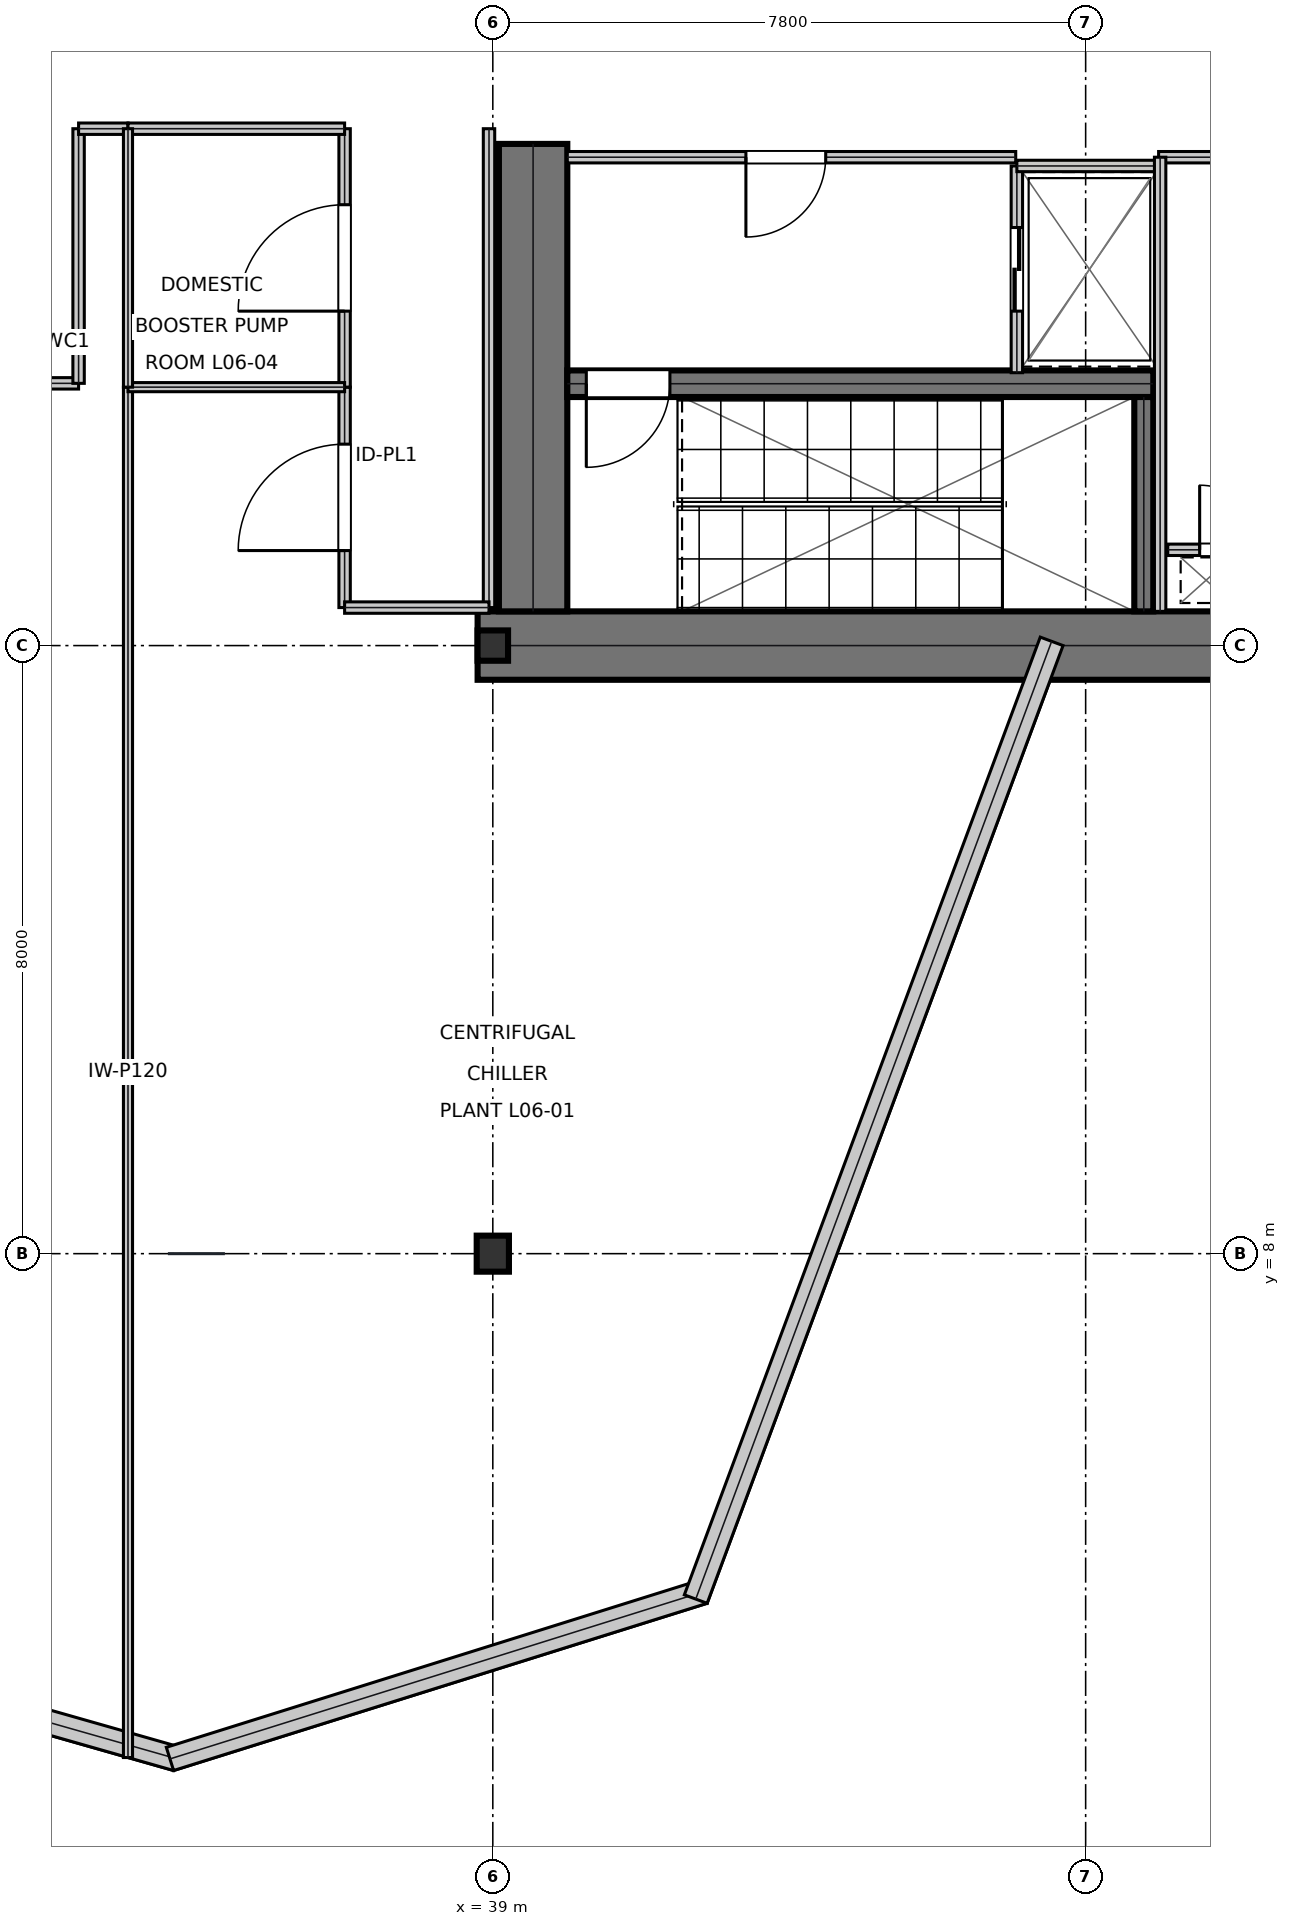
"""IFC4 building model, lengths in metres.
Left out: names, types, materials, properties, quantities, classifications, styles, units other than length and angle.
Written with IfcOpenShell. Run it as: python <this file> out.ifc"""

import sys

from ifc_helpers import new_model, si_unit, direction, frame, frame_2d, origin, origin_2d, place, context, subcontext, project, spatial, rectangle, i_section, extrude, element, fill, save


model = new_model("IFC4")
c1 = context("Model", 3, precision=1e-05, world=origin(), true_north=direction((0.0, 1.0)))
c2 = subcontext(c1, "Body", "Model", "MODEL_VIEW")
j1 = project(units=[si_unit("LENGTHUNIT", "METRE"), si_unit("PLANEANGLEUNIT", "RADIAN")], contexts=[c1])
p1 = place(None, origin())
s1 = spatial("IfcSite", under=j1, at=p1, CompositionType="ELEMENT")
p2 = place(p1, origin())
s2 = spatial("IfcBuilding", under=s1, at=p2, CompositionType="ELEMENT")
p3 = place(p2, frame((0.0, 0.0, 32.4)))
s3 = spatial("IfcBuildingStorey", under=s2, at=p3, CompositionType="ELEMENT", Elevation=32.4)
p4 = place(p3, frame((38.8, 16.0, 0.0), z_axis=(0.0, 0.0, 1.0), x_axis=(1.0, 0.0, 0.0)))
e1 = element("IfcWall", 1, at=p4, inside=s3, PredefinedType="SHEAR", context=c2, shape_type="SweptSolid", body=[
    extrude(rectangle(XDim=16.0, YDim=0.9, at=frame_2d((8.0, 0.0))), origin(), (0.0, 0.0, 1.0), 5.16),
])
p5 = place(p3, frame((39.53, 16.45, 0.0), z_axis=(0.0, 0.0, 1.0), x_axis=(0.0, 1.0, 0.0)))
e2 = element("IfcWall", 2, at=p5, inside=s3, PredefinedType="SHEAR", context=c2, shape_type="SweptSolid", body=[
    extrude(rectangle(XDim=6.15, YDim=0.9, at=frame_2d((3.075, 0.0))), origin(), (0.0, 0.0, 1.0), 5.16),
])
p6 = place(p3, frame((39.98, 19.445, 0.0), z_axis=(0.0, 0.0, 1.0), x_axis=(1.0, 0.0, 0.0)))
e3 = element("IfcWall", 3, at=p6, inside=s3, PredefinedType="SHEAR", context=c2, shape_type="SweptSolid", body=[
    extrude(rectangle(XDim=7.71, YDim=0.35, at=frame_2d((3.855, 0.0))), origin(), (0.0, 0.0, 1.0), 5.16),
])
p7 = place(p6, frame((0.25, 0.0, 0.0)))
e4 = element("IfcOpeningElement", 4, at=p7, cuts=e3, PredefinedType="OPENING", context=c2, shape_type="SweptSolid", body=[
    extrude(rectangle(XDim=1.1, YDim=2.15, at=frame_2d((0.55, 1.075))), frame((0.0, 0.185, 0.0), z_axis=(0.0, -1.0, 0.0), x_axis=(1.0, 0.0, 0.0)), (0.0, 0.0, 1.0), 0.37),
])
p8 = place(p3, frame((47.565, 16.45, 0.0), z_axis=(0.0, 0.0, 1.0), x_axis=(0.0, 1.0, 0.0)))
e5 = element("IfcWall", 5, at=p8, inside=s3, PredefinedType="SHEAR", context=c2, shape_type="SweptSolid", body=[
    extrude(rectangle(XDim=2.82, YDim=0.25, at=frame_2d((1.41, 0.0))), origin(), (0.0, 0.0, 1.0), 5.16),
])
p9 = place(p3, frame((39.0, 16.0, 0.0), z_axis=(0.0, 0.0, 1.0), x_axis=(1.0, 0.0, 0.0)))
e6 = element("IfcColumn", 6, at=p9, inside=s3, PredefinedType="COLUMN", context=c2, shape_type="SweptSolid", body=[
    extrude(i_section(OverallWidth=0.401, OverallDepth=0.399, WebThickness=0.025, FlangeThickness=0.04, at=origin_2d()), origin(), (0.0, 0.0, 1.0), 5.394),
])
p10 = place(p3, frame((39.0, 8.0, 0.016), z_axis=(-0.002773965371, 0.016780216752, 0.99985535426), x_axis=(-0.986609855888, -0.163098106258, 0.0)))
e7 = element("IfcColumn", 7, at=p10, inside=s3, PredefinedType="COLUMN", context=c2, shape_type="SweptSolid", body=[
    extrude(i_section(OverallWidth=0.424, OverallDepth=0.474, WebThickness=0.048, FlangeThickness=0.077, at=origin_2d()), origin(), (0.0, 0.0, 1.0), 5.369),
])
p11 = place(p3, frame((27.824, 3.354, 0.0), z_axis=(0.0, 0.0, 1.0), x_axis=(0.961730666524, -0.273996578569, 0.0)))
e8 = element("IfcWall", 8, at=p11, inside=s3, PredefinedType="STANDARD", context=c2, shape_type="SweptSolid", body=[
    extrude(rectangle(XDim=7.299, YDim=0.32, at=frame_2d((3.65, 0.0))), origin(), (0.0, 0.0, 1.0), 5.16),
])
p12 = place(p3, frame((34.752, 1.353, 0.0), z_axis=(0.0, 0.0, 1.0), x_axis=(0.954239925005, 0.299042079858, 0.0)))
e9 = element("IfcWall", 9, at=p12, inside=s3, PredefinedType="STANDARD", context=c2, shape_type="SweptSolid", body=[
    extrude(rectangle(XDim=7.357, YDim=0.32, at=frame_2d((3.678, 0.0))), origin(), (0.0, 0.0, 1.0), 5.16),
])
p13 = place(p3, frame((41.67, 3.456, 0.0), z_axis=(0.0, 0.0, 1.0), x_axis=(0.34837713867, 0.937354452303, 0.0)))
e10 = element("IfcWall", 10, at=p13, inside=s3, PredefinedType="STANDARD", context=c2, shape_type="SweptSolid", body=[
    extrude(rectangle(XDim=13.442, YDim=0.32, at=frame_2d((6.721, 0.0))), origin(), (0.0, 0.0, 1.0), 4.688),
])
p14 = place(p3, frame((39.98, 22.425, 0.0), z_axis=(0.0, 0.0, 1.0), x_axis=(1.0, 0.0, 0.0)))
e11 = element("IfcWall", 11, at=p14, inside=s3, PredefinedType="PARTITIONING", context=c2, shape_type="SweptSolid", body=[
    extrude(rectangle(XDim=5.9, YDim=0.15, at=frame_2d((2.95, 0.0))), origin(), (0.0, 0.0, 1.0), 5.16),
])
p15 = place(p14, frame((2.35, 0.0, 0.0)))
e12 = element("IfcOpeningElement", 12, at=p15, cuts=e11, PredefinedType="OPENING", context=c2, shape_type="SweptSolid", body=[
    extrude(rectangle(XDim=1.05, YDim=2.15, at=frame_2d((0.525, 1.075))), frame((0.0, 0.085, 0.0), z_axis=(0.0, -1.0, 0.0), x_axis=(1.0, 0.0, 0.0)), (0.0, 0.0, 1.0), 0.17),
])
p16 = place(p3, frame((45.895, 19.59, 0.0), z_axis=(0.0, 0.0, 1.0), x_axis=(0.0, 1.0, 0.0)))
e13 = element("IfcWall", 13, at=p16, inside=s3, PredefinedType="PARTITIONING", context=c2, shape_type="SweptSolid", body=[
    extrude(rectangle(XDim=2.72, YDim=0.15, at=frame_2d((1.36, 0.0))), origin(), (0.0, 0.0, 1.0), 5.16),
])
p17 = place(p16, frame((0.81, 0.0, 0.0)))
e14 = element("IfcOpeningElement", 14, at=p17, cuts=e13, PredefinedType="OPENING", context=c2, shape_type="SweptSolid", body=[
    extrude(rectangle(XDim=1.1, YDim=2.15, at=frame_2d((0.55, 1.075))), frame((0.0, 0.085, 0.0), z_axis=(0.0, -1.0, 0.0), x_axis=(1.0, 0.0, 0.0)), (0.0, 0.0, 1.0), 0.17),
])
p18 = place(p3, frame((45.895, 22.31, 0.0), z_axis=(0.0, 0.0, 1.0), x_axis=(1.0, 0.0, 0.0)))
e15 = element("IfcWall", 15, at=p18, inside=s3, PredefinedType="PARTITIONING", context=c2, shape_type="SweptSolid", body=[
    extrude(rectangle(XDim=1.915, YDim=0.15, at=frame_2d((0.958, 0.0))), origin(), (0.0, 0.0, 1.0), 5.16),
])
p19 = place(p3, frame((47.88, 17.26, 0.0), z_axis=(0.0, 0.0, 1.0), x_axis=(1.0, 0.0, 0.0)))
e16 = element("IfcWall", 16, at=p19, inside=s3, PredefinedType="PARTITIONING", context=c2, shape_type="SweptSolid", body=[
    extrude(rectangle(XDim=1.72, YDim=0.15, at=frame_2d((0.86, 0.0))), origin(), (0.0, 0.0, 1.0), 5.16),
])
p20 = place(p19, frame((0.42, 0.0, 0.0)))
e17 = element("IfcOpeningElement", 17, at=p20, cuts=e16, PredefinedType="OPENING", context=c2, shape_type="SweptSolid", body=[
    extrude(rectangle(XDim=0.85, YDim=2.15, at=frame_2d((0.425, 1.075))), frame((0.0, 0.085, 0.0), z_axis=(0.0, -1.0, 0.0), x_axis=(1.0, 0.0, 0.0)), (0.0, 0.0, 1.0), 0.17),
])
p21 = place(p3, frame((47.76, 22.425, 0.0), z_axis=(0.0, 0.0, 1.0), x_axis=(1.0, 0.0, 0.0)))
e18 = element("IfcWall", 18, at=p21, inside=s3, PredefinedType="PARTITIONING", context=c2, shape_type="SweptSolid", body=[
    extrude(rectangle(XDim=1.96, YDim=0.15, at=frame_2d((0.98, 0.0))), origin(), (0.0, 0.0, 1.0), 5.16),
])
p22 = place(p3, frame((47.78, 16.45, 0.0), z_axis=(0.0, 0.0, 1.0), x_axis=(0.0, 1.0, 0.0)))
e19 = element("IfcWall", 19, at=p22, inside=s3, PredefinedType="PARTITIONING", context=c2, shape_type="SweptSolid", body=[
    extrude(rectangle(XDim=5.975, YDim=0.15, at=frame_2d((2.988, 0.0))), origin(), (0.0, 0.0, 1.0), 5.16),
])
p23 = place(p3, frame((37.05, 16.5, 0.0), z_axis=(0.0, 0.0, 1.0), x_axis=(0.0, 1.0, 0.0)))
e20 = element("IfcWall", 20, at=p23, inside=s3, PredefinedType="PARTITIONING", context=c2, shape_type="SweptSolid", body=[
    extrude(rectangle(XDim=2.9, YDim=0.15, at=frame_2d((1.45, 0.0))), origin(), (0.0, 0.0, 1.0), 4.741),
])
p24 = place(p23, frame((0.75, 0.0, 0.0)))
e21 = element("IfcOpeningElement", 21, at=p24, cuts=e20, PredefinedType="OPENING", context=c2, shape_type="SweptSolid", body=[
    extrude(rectangle(XDim=1.4, YDim=2.2, at=frame_2d((0.7, 1.1))), frame((0.0, 0.085, 0.0), z_axis=(0.0, -1.0, 0.0), x_axis=(1.0, 0.0, 0.0)), (0.0, 0.0, 1.0), 0.17),
])
p25 = place(p3, frame((31.8, 19.45, 0.0), z_axis=(0.0, 0.0, 1.0), x_axis=(1.0, 0.0, 0.0)))
e22 = element("IfcWall", 22, at=p25, inside=s3, PredefinedType="PARTITIONING", context=c2, shape_type="SweptSolid", body=[
    extrude(rectangle(XDim=1.75, YDim=0.15, at=frame_2d((0.875, 0.0))), origin(), (0.0, 0.0, 1.0), 5.16),
])
p26 = place(p25, frame((0.45, 0.0, 0.0)))
e23 = element("IfcOpeningElement", 23, at=p26, cuts=e22, PredefinedType="OPENING", context=c2, shape_type="SweptSolid", body=[
    extrude(rectangle(XDim=0.85, YDim=2.15, at=frame_2d((0.425, 1.075))), frame((0.0, 0.085, 0.0), z_axis=(0.0, -1.0, 0.0), x_axis=(1.0, 0.0, 0.0)), (0.0, 0.0, 1.0), 0.17),
])
p27 = place(p3, frame((37.05, 19.4, 0.0), z_axis=(0.0, 0.0, 1.0), x_axis=(0.0, 1.0, 0.0)))
e24 = element("IfcWall", 24, at=p27, inside=s3, PredefinedType="PARTITIONING", context=c2, shape_type="SweptSolid", body=[
    extrude(rectangle(XDim=3.4, YDim=0.15, at=frame_2d((1.7, 0.0))), origin(), (0.0, 0.0, 1.0), 4.741),
])
p28 = place(p27, frame((1.0, 0.0, 0.0)))
e25 = element("IfcOpeningElement", 25, at=p28, cuts=e24, PredefinedType="OPENING", context=c2, shape_type="SweptSolid", body=[
    extrude(rectangle(XDim=1.4, YDim=2.2, at=frame_2d((0.7, 1.1))), frame((0.0, 0.085, 0.0), z_axis=(0.0, -1.0, 0.0), x_axis=(1.0, 0.0, 0.0)), (0.0, 0.0, 1.0), 0.17),
])
p29 = place(p3, frame((38.95, 16.5, 0.0), z_axis=(0.0, 0.0, 1.0), x_axis=(0.0, 1.0, 0.0)))
e26 = element("IfcWall", 26, at=p29, inside=s3, PredefinedType="PARTITIONING", context=c2, shape_type="SweptSolid", body=[
    extrude(rectangle(XDim=6.3, YDim=0.15, at=frame_2d((3.15, 0.0))), origin(), (0.0, 0.0, 1.0), 4.741),
])
p30 = place(p3, frame((37.05, 16.5, 0.0), z_axis=(0.0, 0.0, 1.0), x_axis=(1.0, 0.0, 0.0)))
e27 = element("IfcWall", 27, at=p30, inside=s3, PredefinedType="PARTITIONING", context=c2, shape_type="SweptSolid", body=[
    extrude(rectangle(XDim=1.9, YDim=0.15, at=frame_2d((0.95, 0.0))), origin(), (0.0, 0.0, 1.0), 5.16),
])
p31 = place(p3, frame((33.55, 19.45, 0.0), z_axis=(0.0, 0.0, 1.0), x_axis=(0.0, 1.0, 0.0)))
e28 = element("IfcWall", 28, at=p31, inside=s3, PredefinedType="PARTITIONING", context=c2, shape_type="SweptSolid", body=[
    extrude(rectangle(XDim=3.35, YDim=0.15, at=frame_2d((1.675, 0.0))), origin(), (0.0, 0.0, 1.0), 4.741),
])
p32 = place(p3, frame((33.55, 22.8, 0.0), z_axis=(0.0, 0.0, 1.0), x_axis=(1.0, 0.0, 0.0)))
e29 = element("IfcWall", 29, at=p32, inside=s3, PredefinedType="PARTITIONING", context=c2, shape_type="SweptSolid", body=[
    extrude(rectangle(XDim=0.65, YDim=0.15, at=frame_2d((0.325, 0.0))), origin(), (0.0, 0.0, 1.0), 5.16),
])
p33 = place(p3, frame((34.2, 22.8, 0.0), z_axis=(0.0, 0.0, 1.0), x_axis=(1.0, 0.0, 0.0)))
e30 = element("IfcWall", 30, at=p33, inside=s3, PredefinedType="PARTITIONING", context=c2, shape_type="SweptSolid", body=[
    extrude(rectangle(XDim=2.85, YDim=0.15, at=frame_2d((1.425, 0.0))), origin(), (0.0, 0.0, 1.0), 5.16),
])
p34 = place(p3, frame((34.2, 1.371, 0.0), z_axis=(0.0, 0.0, 1.0), x_axis=(0.0, 1.0, 0.0)))
e31 = element("IfcWall", 31, at=p34, inside=s3, PredefinedType="PARTITIONING", context=c2, shape_type="SweptSolid", body=[
    extrude(rectangle(XDim=18.029, YDim=0.12, at=frame_2d((9.015, 0.0))), origin(), (0.0, 0.0, 1.0), 4.531),
])
p35 = place(p3, frame((34.2, 19.4, 0.0), z_axis=(0.0, 0.0, 1.0), x_axis=(1.0, 0.0, 0.0)))
e32 = element("IfcWall", 32, at=p35, inside=s3, PredefinedType="PARTITIONING", context=c2, shape_type="SweptSolid", body=[
    extrude(rectangle(XDim=2.85, YDim=0.12, at=frame_2d((1.425, 0.0))), origin(), (0.0, 0.0, 1.0), 5.16),
])
p36 = place(p3, frame((34.2, 19.4, 0.0), z_axis=(0.0, 0.0, 1.0), x_axis=(0.0, 1.0, 0.0)))
e33 = element("IfcWall", 33, at=p36, inside=s3, PredefinedType="PARTITIONING", context=c2, shape_type="SweptSolid", body=[
    extrude(rectangle(XDim=3.4, YDim=0.12, at=frame_2d((1.7, 0.0))), origin(), (0.0, 0.0, 1.0), 4.741),
])
p37 = place(p15, frame((1.05, 0.0, 0.0), z_axis=(0.0, 0.0, 1.0), x_axis=(-1.0, 0.0, 0.0)))
e34 = element("IfcDoor", 34, at=p37, inside=s3, OperationType="SINGLE_SWING_RIGHT", PredefinedType="DOOR", context=c2, shape_type="SweptSolid", body=[
    extrude(rectangle(XDim=1.05, YDim=2.15, at=frame_2d((0.525, 1.075))), frame((0.0, 0.025, 0.0), z_axis=(0.0, -1.0, 0.0), x_axis=(1.0, 0.0, 0.0)), (0.0, 0.0, 1.0), 0.05),
])
fill(e12, e34)
p38 = place(p17, frame((1.1, 0.0, 0.0), z_axis=(0.0, 0.0, 1.0), x_axis=(-1.0, 0.0, 0.0)))
e35 = element("IfcDoor", 35, at=p38, inside=s3, OperationType="DOUBLE_DOOR_SLIDING", PredefinedType="DOOR", context=c2, shape_type="SweptSolid", body=[
    extrude(rectangle(XDim=1.1, YDim=2.15, at=frame_2d((0.55, 1.075))), frame((0.0, 0.025, 0.0), z_axis=(0.0, -1.0, 0.0), x_axis=(1.0, 0.0, 0.0)), (0.0, 0.0, 1.0), 0.05),
])
fill(e14, e35)
p39 = place(p20, origin())
e36 = element("IfcDoor", 36, at=p39, inside=s3, OperationType="SINGLE_SWING_LEFT", PredefinedType="TRAPDOOR", context=c2, shape_type="SweptSolid", body=[
    extrude(rectangle(XDim=0.85, YDim=2.15, at=frame_2d((0.425, 1.075))), frame((0.0, 0.025, 0.0), z_axis=(0.0, -1.0, 0.0), x_axis=(1.0, 0.0, 0.0)), (0.0, 0.0, 1.0), 0.05),
])
fill(e17, e36)
p40 = place(p24, origin())
e37 = element("IfcDoor", 37, at=p40, inside=s3, OperationType="SINGLE_SWING_LEFT", PredefinedType="DOOR", context=c2, shape_type="SweptSolid", body=[
    extrude(rectangle(XDim=1.4, YDim=2.2, at=frame_2d((0.7, 1.1))), frame((0.0, 0.025, 0.0), z_axis=(0.0, -1.0, 0.0), x_axis=(1.0, 0.0, 0.0)), (0.0, 0.0, 1.0), 0.05),
])
fill(e21, e37)
p41 = place(p28, origin())
e38 = element("IfcDoor", 38, at=p41, inside=s3, OperationType="SINGLE_SWING_LEFT", PredefinedType="DOOR", context=c2, shape_type="SweptSolid", body=[
    extrude(rectangle(XDim=1.4, YDim=2.2, at=frame_2d((0.7, 1.1))), frame((0.0, 0.025, 0.0), z_axis=(0.0, -1.0, 0.0), x_axis=(1.0, 0.0, 0.0)), (0.0, 0.0, 1.0), 0.05),
])
fill(e25, e38)
p42 = place(p7, frame((1.1, 0.0, 0.0), z_axis=(0.0, 0.0, 1.0), x_axis=(-1.0, 0.0, 0.0)))
e39 = element("IfcDoor", 39, at=p42, inside=s3, OperationType="SINGLE_SWING_RIGHT", PredefinedType="DOOR", context=c2, shape_type="SweptSolid", body=[
    extrude(rectangle(XDim=1.1, YDim=2.15, at=frame_2d((0.55, 1.075))), frame((0.0, 0.025, 0.0), z_axis=(0.0, -1.0, 0.0), x_axis=(1.0, 0.0, 0.0)), (0.0, 0.0, 1.0), 0.05),
])
fill(e4, e39)
save(model, sys.argv[1])
